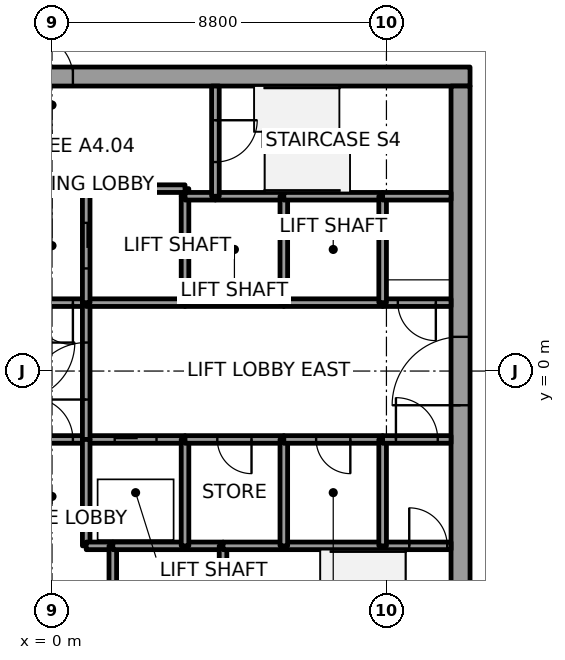
"""IFC4 building model, lengths in metres.
Left out: names, types, materials, properties, quantities, classifications, styles, units other than length and angle.
Written with IfcOpenShell. Run it as: python <this file> out.ifc"""

import sys

from ifc_helpers import new_model, si_unit, direction, frame, frame_2d, origin, place, context, subcontext, project, spatial, rectangle, extrude, element, fill, save


model = new_model("IFC4")
c1 = context("Model", 3, precision=1e-05, world=origin(), true_north=direction((0.0, 1.0)))
c2 = subcontext(c1, "Body", "Model", "MODEL_VIEW")
j1 = project(units=[si_unit("LENGTHUNIT", "METRE"), si_unit("PLANEANGLEUNIT", "RADIAN")], contexts=[c1])
p1 = place(None, origin())
s1 = spatial("IfcSite", under=j1, at=p1, CompositionType="ELEMENT")
p2 = place(p1, origin())
s2 = spatial("IfcBuilding", under=s1, at=p2, CompositionType="ELEMENT")
p3 = place(p2, frame((0.0, 0.0, 16.8)))
s3 = spatial("IfcBuildingStorey", under=s2, at=p3, CompositionType="ELEMENT", Elevation=16.8)
p4 = place(p3, frame((-11.0, 7.75, 0.0), z_axis=(0.0, 0.0, 1.0), x_axis=(1.0, 0.0, 0.0)))
e1 = element("IfcWall", 1, at=p4, inside=s3, PredefinedType="SHEAR", context=c2, shape_type="SweptSolid", body=[
    extrude(rectangle(XDim=22.0, YDim=0.5, at=frame_2d((11.0, 0.0))), origin(), (0.0, 0.0, 1.0), 5.4),
])
p5 = place(p4, frame((10.45, 0.0, 0.0)))
e2 = element("IfcOpeningElement", 2, at=p5, cuts=e1, PredefinedType="OPENING", context=c2, shape_type="SweptSolid", body=[
    extrude(rectangle(XDim=1.1, YDim=2.1, at=frame_2d((0.55, 1.05))), frame((0.0, 0.25, 0.0), z_axis=(0.0, -1.0, 0.0), x_axis=(1.0, 0.0, 0.0)), (0.0, 0.0, 1.0), 0.5),
])
p6 = place(p3, frame((10.75, -7.5, 0.0), z_axis=(0.0, 0.0, 1.0), x_axis=(0.0, 1.0, 0.0)))
e3 = element("IfcWall", 3, at=p6, inside=s3, PredefinedType="SHEAR", context=c2, shape_type="SweptSolid", body=[
    extrude(rectangle(XDim=15.0, YDim=0.5, at=frame_2d((7.5, 0.0))), origin(), (0.0, 0.0, 1.0), 5.4),
])
p7 = place(p6, frame((6.6, 0.0, 0.0)))
e4 = element("IfcOpeningElement", 4, at=p7, cuts=e3, PredefinedType="OPENING", context=c2, shape_type="SweptSolid", body=[
    extrude(rectangle(XDim=1.8, YDim=2.1, at=frame_2d((0.9, 1.05))), frame((0.0, 0.25, 0.0), z_axis=(0.0, -1.0, 0.0), x_axis=(1.0, 0.0, 0.0)), (0.0, 0.0, 1.0), 0.5),
])
p8 = place(p3, frame((-0.9, -1.8, 0.0), z_axis=(0.0, 0.0, 1.0), x_axis=(1.0, 0.0, 0.0)))
e5 = element("IfcWall", 5, at=p8, inside=s3, PredefinedType="SOLIDWALL", context=c2, shape_type="SweptSolid", body=[
    extrude(rectangle(XDim=1.8, YDim=0.2, at=frame_2d((0.9, 0.0))), origin(), (0.0, 0.0, 1.0), 5.15),
])
p9 = place(p8, frame((0.35, 0.0, 0.0)))
e6 = element("IfcOpeningElement", 6, at=p9, cuts=e5, PredefinedType="OPENING", context=c2, shape_type="SweptSolid", body=[
    extrude(rectangle(XDim=1.1, YDim=2.4, at=frame_2d((0.55, 1.2))), frame((0.0, 0.1, 0.0), z_axis=(0.0, -1.0, 0.0), x_axis=(1.0, 0.0, 0.0)), (0.0, 0.0, 1.0), 0.2),
])
p10 = place(p3, frame((0.9, 1.8, 0.0), z_axis=(0.0, 0.0, 1.0), x_axis=(-1.0, 0.0, 0.0)))
e7 = element("IfcWall", 7, at=p10, inside=s3, PredefinedType="SOLIDWALL", context=c2, shape_type="SweptSolid", body=[
    extrude(rectangle(XDim=1.8, YDim=0.2, at=frame_2d((0.9, 0.0))), origin(), (0.0, 0.0, 1.0), 5.15),
])
p11 = place(p10, frame((0.35, 0.0, 0.0)))
e8 = element("IfcOpeningElement", 8, at=p11, cuts=e7, PredefinedType="OPENING", context=c2, shape_type="SweptSolid", body=[
    extrude(rectangle(XDim=1.1, YDim=2.4, at=frame_2d((0.55, 1.2))), frame((0.0, 0.1, 0.0), z_axis=(0.0, -1.0, 0.0), x_axis=(1.0, 0.0, 0.0)), (0.0, 0.0, 1.0), 0.2),
])
p12 = place(p3, frame((0.9, -1.8, 0.0), z_axis=(0.0, 0.0, 1.0), x_axis=(1.0, 0.0, 0.0)))
e9 = element("IfcWall", 9, at=p12, inside=s3, PredefinedType="SOLIDWALL", context=c2, shape_type="SweptSolid", body=[
    extrude(rectangle(XDim=2.6, YDim=0.2, at=frame_2d((1.3, 0.0))), origin(), (0.0, 0.0, 1.0), 5.15),
])
p13 = place(p12, frame((0.75, 0.0, 0.0)))
e10 = element("IfcOpeningElement", 10, at=p13, cuts=e9, PredefinedType="OPENING", context=c2, shape_type="SweptSolid", body=[
    extrude(rectangle(XDim=1.1, YDim=2.1, at=frame_2d((0.55, 1.05))), frame((0.0, 0.1, 0.0), z_axis=(0.0, -1.0, 0.0), x_axis=(1.0, 0.0, 0.0)), (0.0, 0.0, 1.0), 0.2),
])
p14 = place(p3, frame((0.9, -1.8, 0.0), z_axis=(0.0, 0.0, 1.0), x_axis=(0.0, 1.0, 0.0)))
e11 = element("IfcWall", 11, at=p14, inside=s3, PredefinedType="SOLIDWALL", context=c2, shape_type="SweptSolid", body=[
    extrude(rectangle(XDim=3.6, YDim=0.2, at=frame_2d((1.8, 0.0))), origin(), (0.0, 0.0, 1.0), 5.15),
])
p15 = place(p14, frame((1.05, 0.0, 0.0)))
e12 = element("IfcOpeningElement", 12, at=p15, cuts=e11, PredefinedType="OPENING", context=c2, shape_type="SweptSolid", body=[
    extrude(rectangle(XDim=1.5, YDim=2.4, at=frame_2d((0.75, 1.2))), frame((0.0, 0.1, 0.0), z_axis=(0.0, -1.0, 0.0), x_axis=(1.0, 0.0, 0.0)), (0.0, 0.0, 1.0), 0.2),
])
p16 = place(p3, frame((0.9, -1.8, 0.0), z_axis=(0.0, 0.0, 1.0), x_axis=(0.0, -1.0, 0.0)))
e13 = element("IfcWall", 13, at=p16, inside=s3, PredefinedType="SOLIDWALL", context=c2, shape_type="SweptSolid", body=[
    extrude(rectangle(XDim=2.8, YDim=0.2, at=frame_2d((1.4, 0.0))), origin(), (0.0, 0.0, 1.0), 5.15),
])
p17 = place(p3, frame((0.9, -4.6, 0.0), z_axis=(0.0, 0.0, 1.0), x_axis=(1.0, 0.0, 0.0)))
e14 = element("IfcWall", 14, at=p17, inside=s3, PredefinedType="SOLIDWALL", context=c2, shape_type="SweptSolid", body=[
    extrude(rectangle(XDim=0.7, YDim=0.2, at=frame_2d((0.35, 0.0))), origin(), (0.0, 0.0, 1.0), 5.15),
])
p18 = place(p3, frame((3.5, 1.8, 0.0), z_axis=(0.0, 0.0, 1.0), x_axis=(-1.0, 0.0, 0.0)))
e15 = element("IfcWall", 15, at=p18, inside=s3, PredefinedType="SOLIDWALL", context=c2, shape_type="SweptSolid", body=[
    extrude(rectangle(XDim=2.6, YDim=0.2, at=frame_2d((1.3, 0.0))), origin(), (0.0, 0.0, 1.0), 5.15),
])
p19 = place(p3, frame((3.5, 4.6, 0.0), z_axis=(0.0, 0.0, 1.0), x_axis=(0.0, 1.0, 0.0)))
e16 = element("IfcWall", 16, at=p19, inside=s3, PredefinedType="SOLIDWALL", context=c2, shape_type="SweptSolid", body=[
    extrude(rectangle(XDim=0.2, YDim=0.2, at=frame_2d((0.1, 0.0))), origin(), (0.0, 0.0, 1.0), 5.15),
])
p20 = place(p3, frame((3.5, 4.8, 0.0), z_axis=(0.0, 0.0, 1.0), x_axis=(-1.0, 0.0, 0.0)))
e17 = element("IfcWall", 17, at=p20, inside=s3, PredefinedType="SOLIDWALL", context=c2, shape_type="SweptSolid", body=[
    extrude(rectangle(XDim=2.6, YDim=0.2, at=frame_2d((1.3, 0.0))), origin(), (0.0, 0.0, 1.0), 5.15),
])
p21 = place(p3, frame((0.9, 4.8, 0.0), z_axis=(0.0, 0.0, 1.0), x_axis=(0.0, -1.0, 0.0)))
e18 = element("IfcWall", 18, at=p21, inside=s3, PredefinedType="SOLIDWALL", context=c2, shape_type="SweptSolid", body=[
    extrude(rectangle(XDim=3.0, YDim=0.2, at=frame_2d((1.5, 0.0))), origin(), (0.0, 0.0, 1.0), 5.15),
])
p22 = place(p21, frame((0.9, 0.0, 0.0)))
e19 = element("IfcOpeningElement", 19, at=p22, cuts=e18, PredefinedType="OPENING", context=c2, shape_type="SweptSolid", body=[
    extrude(rectangle(XDim=1.2, YDim=2.1, at=frame_2d((0.6, 1.05))), frame((0.0, 0.1, 0.0), z_axis=(0.0, -1.0, 0.0), x_axis=(1.0, 0.0, 0.0)), (0.0, 0.0, 1.0), 0.2),
])
p23 = place(p3, frame((1.6, -4.6, 0.0), z_axis=(0.0, 0.0, 1.0), x_axis=(0.0, -1.0, 0.0)))
e20 = element("IfcWall", 20, at=p23, inside=s3, PredefinedType="SOLIDWALL", context=c2, shape_type="SweptSolid", body=[
    extrude(rectangle(XDim=2.9, YDim=0.2, at=frame_2d((1.45, 0.0))), origin(), (0.0, 0.0, 1.0), 5.15),
])
p24 = place(p23, frame((1.0, 0.0, 0.0)))
e21 = element("IfcOpeningElement", 21, at=p24, cuts=e20, PredefinedType="OPENING", context=c2, shape_type="SweptSolid", body=[
    extrude(rectangle(XDim=0.9, YDim=2.4, at=frame_2d((0.45, 1.2))), frame((0.0, 0.1, 0.0), z_axis=(0.0, -1.0, 0.0), x_axis=(1.0, 0.0, 0.0)), (0.0, 0.0, 1.0), 0.2),
])
p25 = place(p3, frame((3.5, -4.6, 0.0), z_axis=(0.0, 0.0, 1.0), x_axis=(-1.0, 0.0, 0.0)))
e22 = element("IfcWall", 22, at=p25, inside=s3, PredefinedType="SOLIDWALL", context=c2, shape_type="SweptSolid", body=[
    extrude(rectangle(XDim=1.9, YDim=0.2, at=frame_2d((0.95, 0.0))), origin(), (0.0, 0.0, 1.0), 5.15),
])
p26 = place(p3, frame((3.5, -4.6, 0.0), z_axis=(0.0, 0.0, 1.0), x_axis=(1.0, 0.0, 0.0)))
e23 = element("IfcWall", 23, at=p26, inside=s3, PredefinedType="SOLIDWALL", context=c2, shape_type="SweptSolid", body=[
    extrude(rectangle(XDim=1.0, YDim=0.2, at=frame_2d((0.5, 0.0))), origin(), (0.0, 0.0, 1.0), 5.15),
])
p27 = place(p3, frame((3.5, -1.8, 0.0), z_axis=(0.0, 0.0, 1.0), x_axis=(0.0, -1.0, 0.0)))
e24 = element("IfcWall", 24, at=p27, inside=s3, PredefinedType="SOLIDWALL", context=c2, shape_type="SweptSolid", body=[
    extrude(rectangle(XDim=2.8, YDim=0.2, at=frame_2d((1.4, 0.0))), origin(), (0.0, 0.0, 1.0), 5.15),
])
p28 = place(p3, frame((6.1, -1.8, 0.0), z_axis=(0.0, 0.0, 1.0), x_axis=(-1.0, 0.0, 0.0)))
e25 = element("IfcWall", 25, at=p28, inside=s3, PredefinedType="SOLIDWALL", context=c2, shape_type="SweptSolid", body=[
    extrude(rectangle(XDim=2.6, YDim=0.2, at=frame_2d((1.3, 0.0))), origin(), (0.0, 0.0, 1.0), 5.15),
])
p29 = place(p28, frame((0.85, 0.0, 0.0)))
e26 = element("IfcOpeningElement", 26, at=p29, cuts=e25, PredefinedType="OPENING", context=c2, shape_type="SweptSolid", body=[
    extrude(rectangle(XDim=0.9, YDim=2.4, at=frame_2d((0.45, 1.2))), frame((0.0, 0.1, 0.0), z_axis=(0.0, -1.0, 0.0), x_axis=(1.0, 0.0, 0.0)), (0.0, 0.0, 1.0), 0.2),
])
p30 = place(p3, frame((6.1, 1.8, 0.0), z_axis=(0.0, 0.0, 1.0), x_axis=(-1.0, 0.0, 0.0)))
e27 = element("IfcWall", 27, at=p30, inside=s3, PredefinedType="SOLIDWALL", context=c2, shape_type="SweptSolid", body=[
    extrude(rectangle(XDim=2.6, YDim=0.2, at=frame_2d((1.3, 0.0))), origin(), (0.0, 0.0, 1.0), 5.15),
])
p31 = place(p3, frame((3.5, 1.8, 0.0), z_axis=(0.0, 0.0, 1.0), x_axis=(0.0, 1.0, 0.0)))
e28 = element("IfcWall", 28, at=p31, inside=s3, PredefinedType="SOLIDWALL", context=c2, shape_type="SweptSolid", body=[
    extrude(rectangle(XDim=2.8, YDim=0.2, at=frame_2d((1.4, 0.0))), origin(), (0.0, 0.0, 1.0), 5.15),
])
p32 = place(p3, frame((4.3, 4.6, 0.0), z_axis=(0.0, 0.0, 1.0), x_axis=(-1.0, 0.0, 0.0)))
e29 = element("IfcWall", 29, at=p32, inside=s3, PredefinedType="SOLIDWALL", context=c2, shape_type="SweptSolid", body=[
    extrude(rectangle(XDim=0.8, YDim=0.2, at=frame_2d((0.4, 0.0))), origin(), (0.0, 0.0, 1.0), 5.15),
])
p33 = place(p3, frame((6.1, 4.6, 0.0), z_axis=(0.0, 0.0, 1.0), x_axis=(-1.0, 0.0, 0.0)))
e30 = element("IfcWall", 30, at=p33, inside=s3, PredefinedType="SOLIDWALL", context=c2, shape_type="SweptSolid", body=[
    extrude(rectangle(XDim=1.8, YDim=0.2, at=frame_2d((0.9, 0.0))), origin(), (0.0, 0.0, 1.0), 5.15),
])
p34 = place(p3, frame((4.3, 7.5, 0.0), z_axis=(0.0, 0.0, 1.0), x_axis=(0.0, -1.0, 0.0)))
e31 = element("IfcWall", 31, at=p34, inside=s3, PredefinedType="SOLIDWALL", context=c2, shape_type="SweptSolid", body=[
    extrude(rectangle(XDim=2.9, YDim=0.2, at=frame_2d((1.45, 0.0))), origin(), (0.0, 0.0, 1.0), 5.15),
])
p35 = place(p34, frame((0.9, 0.0, 0.0)))
e32 = element("IfcOpeningElement", 32, at=p35, cuts=e31, PredefinedType="OPENING", context=c2, shape_type="SweptSolid", body=[
    extrude(rectangle(XDim=1.1, YDim=2.4, at=frame_2d((0.55, 1.2))), frame((0.0, 0.1, 0.0), z_axis=(0.0, -1.0, 0.0), x_axis=(1.0, 0.0, 0.0)), (0.0, 0.0, 1.0), 0.2),
])
p36 = place(p3, frame((4.5, -7.5, 0.0), z_axis=(0.0, 0.0, 1.0), x_axis=(0.0, 1.0, 0.0)))
e33 = element("IfcWall", 33, at=p36, inside=s3, PredefinedType="SOLIDWALL", context=c2, shape_type="SweptSolid", body=[
    extrude(rectangle(XDim=2.9, YDim=0.2, at=frame_2d((1.45, 0.0))), origin(), (0.0, 0.0, 1.0), 5.15),
])
p37 = place(p3, frame((4.5, -4.6, 0.0), z_axis=(0.0, 0.0, 1.0), x_axis=(1.0, 0.0, 0.0)))
e34 = element("IfcWall", 34, at=p37, inside=s3, PredefinedType="SOLIDWALL", context=c2, shape_type="SweptSolid", body=[
    extrude(rectangle(XDim=1.6, YDim=0.2, at=frame_2d((0.8, 0.0))), origin(), (0.0, 0.0, 1.0), 5.15),
])
p38 = place(p3, frame((6.1, -4.6, 0.0), z_axis=(0.0, 0.0, 1.0), x_axis=(1.0, 0.0, 0.0)))
e35 = element("IfcWall", 35, at=p38, inside=s3, PredefinedType="SOLIDWALL", context=c2, shape_type="SweptSolid", body=[
    extrude(rectangle(XDim=2.6, YDim=0.2, at=frame_2d((1.3, 0.0))), origin(), (0.0, 0.0, 1.0), 5.15),
])
p39 = place(p3, frame((6.1, -4.6, 0.0), z_axis=(0.0, 0.0, 1.0), x_axis=(0.0, 1.0, 0.0)))
e36 = element("IfcWall", 36, at=p39, inside=s3, PredefinedType="SOLIDWALL", context=c2, shape_type="SweptSolid", body=[
    extrude(rectangle(XDim=2.8, YDim=0.2, at=frame_2d((1.4, 0.0))), origin(), (0.0, 0.0, 1.0), 5.15),
])
p40 = place(p3, frame((8.7, -1.8, 0.0), z_axis=(0.0, 0.0, 1.0), x_axis=(-1.0, 0.0, 0.0)))
e37 = element("IfcWall", 37, at=p40, inside=s3, PredefinedType="SOLIDWALL", context=c2, shape_type="SweptSolid", body=[
    extrude(rectangle(XDim=2.6, YDim=0.2, at=frame_2d((1.3, 0.0))), origin(), (0.0, 0.0, 1.0), 5.15),
])
p41 = place(p40, frame((0.85, 0.0, 0.0)))
e38 = element("IfcOpeningElement", 38, at=p41, cuts=e37, PredefinedType="OPENING", context=c2, shape_type="SweptSolid", body=[
    extrude(rectangle(XDim=0.9, YDim=2.4, at=frame_2d((0.45, 1.2))), frame((0.0, 0.1, 0.0), z_axis=(0.0, -1.0, 0.0), x_axis=(1.0, 0.0, 0.0)), (0.0, 0.0, 1.0), 0.2),
])
p42 = place(p3, frame((8.7, 1.8, 0.0), z_axis=(0.0, 0.0, 1.0), x_axis=(-1.0, 0.0, 0.0)))
e39 = element("IfcWall", 39, at=p42, inside=s3, PredefinedType="SOLIDWALL", context=c2, shape_type="SweptSolid", body=[
    extrude(rectangle(XDim=2.6, YDim=0.2, at=frame_2d((1.3, 0.0))), origin(), (0.0, 0.0, 1.0), 5.15),
])
p43 = place(p3, frame((6.1, 1.8, 0.0), z_axis=(0.0, 0.0, 1.0), x_axis=(0.0, 1.0, 0.0)))
e40 = element("IfcWall", 40, at=p43, inside=s3, PredefinedType="SOLIDWALL", context=c2, shape_type="SweptSolid", body=[
    extrude(rectangle(XDim=2.8, YDim=0.2, at=frame_2d((1.4, 0.0))), origin(), (0.0, 0.0, 1.0), 5.15),
])
p44 = place(p3, frame((8.7, 4.6, 0.0), z_axis=(0.0, 0.0, 1.0), x_axis=(-1.0, 0.0, 0.0)))
e41 = element("IfcWall", 41, at=p44, inside=s3, PredefinedType="SOLIDWALL", context=c2, shape_type="SweptSolid", body=[
    extrude(rectangle(XDim=2.6, YDim=0.2, at=frame_2d((1.3, 0.0))), origin(), (0.0, 0.0, 1.0), 5.15),
])
p45 = place(p3, frame((8.7, -4.6, 0.0), z_axis=(0.0, 0.0, 1.0), x_axis=(1.0, 0.0, 0.0)))
e42 = element("IfcWall", 42, at=p45, inside=s3, PredefinedType="SOLIDWALL", context=c2, shape_type="SweptSolid", body=[
    extrude(rectangle(XDim=1.8, YDim=0.2, at=frame_2d((0.9, 0.0))), origin(), (0.0, 0.0, 1.0), 5.15),
])
p46 = place(p45, frame((0.7, 0.0, 0.0)))
e43 = element("IfcOpeningElement", 43, at=p46, cuts=e42, PredefinedType="OPENING", context=c2, shape_type="SweptSolid", body=[
    extrude(rectangle(XDim=1.0, YDim=2.1, at=frame_2d((0.5, 1.05))), frame((0.0, 0.1, 0.0), z_axis=(0.0, -1.0, 0.0), x_axis=(1.0, 0.0, 0.0)), (0.0, 0.0, 1.0), 0.2),
])
p47 = place(p3, frame((8.7, -4.6, 0.0), z_axis=(0.0, 0.0, 1.0), x_axis=(0.0, 1.0, 0.0)))
e44 = element("IfcWall", 44, at=p47, inside=s3, PredefinedType="SOLIDWALL", context=c2, shape_type="SweptSolid", body=[
    extrude(rectangle(XDim=2.8, YDim=0.2, at=frame_2d((1.4, 0.0))), origin(), (0.0, 0.0, 1.0), 5.15),
])
p48 = place(p3, frame((8.7, -1.8, 0.0), z_axis=(0.0, 0.0, 1.0), x_axis=(1.0, 0.0, 0.0)))
e45 = element("IfcWall", 45, at=p48, inside=s3, PredefinedType="SOLIDWALL", context=c2, shape_type="SweptSolid", body=[
    extrude(rectangle(XDim=1.8, YDim=0.2, at=frame_2d((0.9, 0.0))), origin(), (0.0, 0.0, 1.0), 5.15),
])
p49 = place(p48, frame((0.35, 0.0, 0.0)))
e46 = element("IfcOpeningElement", 46, at=p49, cuts=e45, PredefinedType="OPENING", context=c2, shape_type="SweptSolid", body=[
    extrude(rectangle(XDim=1.1, YDim=2.4, at=frame_2d((0.55, 1.2))), frame((0.0, 0.1, 0.0), z_axis=(0.0, -1.0, 0.0), x_axis=(1.0, 0.0, 0.0)), (0.0, 0.0, 1.0), 0.2),
])
p50 = place(p3, frame((10.5, 1.8, 0.0), z_axis=(0.0, 0.0, 1.0), x_axis=(-1.0, 0.0, 0.0)))
e47 = element("IfcWall", 47, at=p50, inside=s3, PredefinedType="SOLIDWALL", context=c2, shape_type="SweptSolid", body=[
    extrude(rectangle(XDim=1.8, YDim=0.2, at=frame_2d((0.9, 0.0))), origin(), (0.0, 0.0, 1.0), 5.15),
])
p51 = place(p50, frame((0.4, 0.0, 0.0)))
e48 = element("IfcOpeningElement", 48, at=p51, cuts=e47, PredefinedType="OPENING", context=c2, shape_type="SweptSolid", body=[
    extrude(rectangle(XDim=1.0, YDim=2.4, at=frame_2d((0.5, 1.2))), frame((0.0, 0.1, 0.0), z_axis=(0.0, -1.0, 0.0), x_axis=(1.0, 0.0, 0.0)), (0.0, 0.0, 1.0), 0.2),
])
p52 = place(p3, frame((8.7, 4.6, 0.0), z_axis=(0.0, 0.0, 1.0), x_axis=(0.0, -1.0, 0.0)))
e49 = element("IfcWall", 49, at=p52, inside=s3, PredefinedType="SOLIDWALL", context=c2, shape_type="SweptSolid", body=[
    extrude(rectangle(XDim=2.8, YDim=0.2, at=frame_2d((1.4, 0.0))), origin(), (0.0, 0.0, 1.0), 5.15),
])
p53 = place(p3, frame((10.5, 4.6, 0.0), z_axis=(0.0, 0.0, 1.0), x_axis=(-1.0, 0.0, 0.0)))
e50 = element("IfcWall", 50, at=p53, inside=s3, PredefinedType="SOLIDWALL", context=c2, shape_type="SweptSolid", body=[
    extrude(rectangle(XDim=1.8, YDim=0.2, at=frame_2d((0.9, 0.0))), origin(), (0.0, 0.0, 1.0), 5.15),
])
p54 = place(p13, origin())
e51 = element("IfcDoor", 51, at=p54, inside=s3, OperationType="SLIDING_TO_LEFT", PredefinedType="DOOR", context=c2, shape_type="SweptSolid", body=[
    extrude(rectangle(XDim=1.1, YDim=2.1, at=frame_2d((0.55, 1.05))), frame((0.0, 0.025, 0.0), z_axis=(0.0, -1.0, 0.0), x_axis=(1.0, 0.0, 0.0)), (0.0, 0.0, 1.0), 0.05),
])
fill(e10, e51)
p55 = place(p22, origin())
e52 = element("IfcDoor", 52, at=p55, inside=s3, OperationType="SLIDING_TO_RIGHT", PredefinedType="DOOR", context=c2, shape_type="SweptSolid", body=[
    extrude(rectangle(XDim=1.2, YDim=2.1, at=frame_2d((0.6, 1.05))), frame((0.0, 0.025, 0.0), z_axis=(0.0, -1.0, 0.0), x_axis=(1.0, 0.0, 0.0)), (0.0, 0.0, 1.0), 0.05),
])
fill(e19, e52)
p56 = place(p15, origin())
e53 = element("IfcDoor", 53, at=p56, inside=s3, OperationType="DOUBLE_DOOR_SINGLE_SWING", PredefinedType="DOOR", context=c2, shape_type="SweptSolid", body=[
    extrude(rectangle(XDim=1.5, YDim=2.4, at=frame_2d((0.75, 1.2))), frame((0.0, 0.025, 0.0), z_axis=(0.0, -1.0, 0.0), x_axis=(1.0, 0.0, 0.0)), (0.0, 0.0, 1.0), 0.05),
])
fill(e12, e53)
p57 = place(p49, origin())
e54 = element("IfcDoor", 54, at=p57, inside=s3, OperationType="SINGLE_SWING_LEFT", PredefinedType="DOOR", context=c2, shape_type="SweptSolid", body=[
    extrude(rectangle(XDim=1.1, YDim=2.4, at=frame_2d((0.55, 1.2))), frame((0.0, 0.025, 0.0), z_axis=(0.0, -1.0, 0.0), x_axis=(1.0, 0.0, 0.0)), (0.0, 0.0, 1.0), 0.05),
])
fill(e46, e54)
p58 = place(p11, origin())
e55 = element("IfcDoor", 55, at=p58, inside=s3, OperationType="SINGLE_SWING_RIGHT", PredefinedType="DOOR", context=c2, shape_type="SweptSolid", body=[
    extrude(rectangle(XDim=1.1, YDim=2.4, at=frame_2d((0.55, 1.2))), frame((0.0, 0.025, 0.0), z_axis=(0.0, -1.0, 0.0), x_axis=(1.0, 0.0, 0.0)), (0.0, 0.0, 1.0), 0.05),
])
fill(e8, e55)
p59 = place(p9, origin())
e56 = element("IfcDoor", 56, at=p59, inside=s3, OperationType="SINGLE_SWING_RIGHT", PredefinedType="DOOR", context=c2, shape_type="SweptSolid", body=[
    extrude(rectangle(XDim=1.1, YDim=2.4, at=frame_2d((0.55, 1.2))), frame((0.0, 0.025, 0.0), z_axis=(0.0, -1.0, 0.0), x_axis=(1.0, 0.0, 0.0)), (0.0, 0.0, 1.0), 0.05),
])
fill(e6, e56)
p60 = place(p51, origin())
e57 = element("IfcDoor", 57, at=p60, inside=s3, OperationType="SINGLE_SWING_LEFT", PredefinedType="DOOR", context=c2, shape_type="SweptSolid", body=[
    extrude(rectangle(XDim=1.0, YDim=2.4, at=frame_2d((0.5, 1.2))), frame((0.0, 0.025, 0.0), z_axis=(0.0, -1.0, 0.0), x_axis=(1.0, 0.0, 0.0)), (0.0, 0.0, 1.0), 0.05),
])
fill(e48, e57)
p61 = place(p46, origin())
e58 = element("IfcDoor", 58, at=p61, inside=s3, OperationType="SINGLE_SWING_RIGHT", PredefinedType="DOOR", context=c2, shape_type="SweptSolid", body=[
    extrude(rectangle(XDim=1.0, YDim=2.1, at=frame_2d((0.5, 1.05))), frame((0.0, 0.025, 0.0), z_axis=(0.0, -1.0, 0.0), x_axis=(1.0, 0.0, 0.0)), (0.0, 0.0, 1.0), 0.05),
])
fill(e43, e58)
p62 = place(p35, origin())
e59 = element("IfcDoor", 59, at=p62, inside=s3, OperationType="SINGLE_SWING_RIGHT", PredefinedType="DOOR", context=c2, shape_type="SweptSolid", body=[
    extrude(rectangle(XDim=1.1, YDim=2.4, at=frame_2d((0.55, 1.2))), frame((0.0, 0.025, 0.0), z_axis=(0.0, -1.0, 0.0), x_axis=(1.0, 0.0, 0.0)), (0.0, 0.0, 1.0), 0.05),
])
fill(e32, e59)
p63 = place(p29, origin())
e60 = element("IfcDoor", 60, at=p63, inside=s3, OperationType="SINGLE_SWING_RIGHT", PredefinedType="DOOR", context=c2, shape_type="SweptSolid", body=[
    extrude(rectangle(XDim=0.9, YDim=2.4, at=frame_2d((0.45, 1.2))), frame((0.0, 0.025, 0.0), z_axis=(0.0, -1.0, 0.0), x_axis=(1.0, 0.0, 0.0)), (0.0, 0.0, 1.0), 0.05),
])
fill(e26, e60)
p64 = place(p41, origin())
e61 = element("IfcDoor", 61, at=p64, inside=s3, OperationType="SINGLE_SWING_LEFT", PredefinedType="DOOR", context=c2, shape_type="SweptSolid", body=[
    extrude(rectangle(XDim=0.9, YDim=2.4, at=frame_2d((0.45, 1.2))), frame((0.0, 0.025, 0.0), z_axis=(0.0, -1.0, 0.0), x_axis=(1.0, 0.0, 0.0)), (0.0, 0.0, 1.0), 0.05),
])
fill(e38, e61)
p65 = place(p7, origin())
e62 = element("IfcDoor", 62, at=p65, inside=s3, OperationType="DOUBLE_DOOR_SINGLE_SWING", PredefinedType="DOOR", context=c2, shape_type="SweptSolid", body=[
    extrude(rectangle(XDim=1.8, YDim=2.1, at=frame_2d((0.9, 1.05))), frame((0.0, 0.025, 0.0), z_axis=(0.0, -1.0, 0.0), x_axis=(1.0, 0.0, 0.0)), (0.0, 0.0, 1.0), 0.05),
])
fill(e4, e62)
p66 = place(p5, origin())
e63 = element("IfcDoor", 63, at=p66, inside=s3, OperationType="SINGLE_SWING_LEFT", PredefinedType="DOOR", context=c2, shape_type="SweptSolid", body=[
    extrude(rectangle(XDim=1.1, YDim=2.1, at=frame_2d((0.55, 1.05))), frame((0.0, 0.025, 0.0), z_axis=(0.0, -1.0, 0.0), x_axis=(1.0, 0.0, 0.0)), (0.0, 0.0, 1.0), 0.05),
])
fill(e2, e63)
save(model, sys.argv[1])
